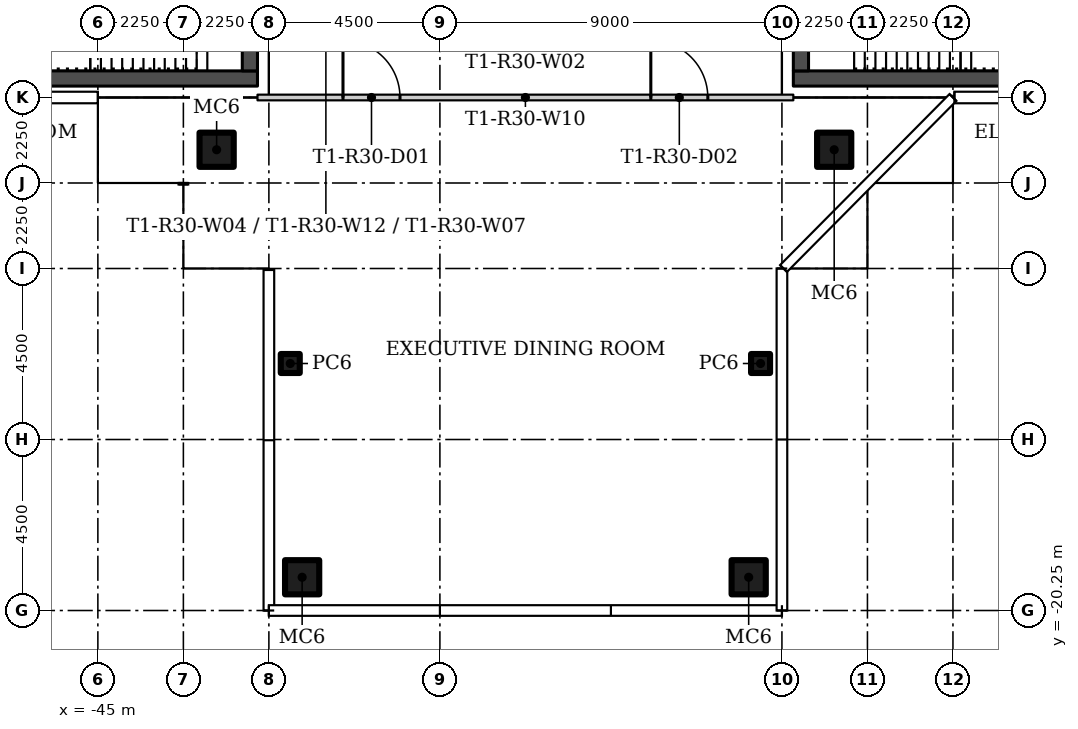
"""IFC4 building model, lengths in metres.
Left out: names, types, materials, properties, quantities, classifications, styles, units other than length and angle.
Written with IfcOpenShell. Run it as: python <this file> out.ifc"""

import sys

from ifc_helpers import new_model, si_unit, direction, frame, frame_2d, origin, origin_2d, place, context, subcontext, project, spatial, rectangle, hollow_rectangle, extrude, element, fill, save


model = new_model("IFC4")
c1 = context("Model", 3, precision=1e-05, world=origin(), true_north=direction((0.0, 1.0)))
c2 = subcontext(c1, "Body", "Model", "MODEL_VIEW")
j1 = project(units=[si_unit("LENGTHUNIT", "METRE"), si_unit("PLANEANGLEUNIT", "RADIAN")], contexts=[c1])
p1 = place(None, origin())
s1 = spatial("IfcSite", under=j1, at=p1, CompositionType="ELEMENT")
p2 = place(p1, origin())
s2 = spatial("IfcBuilding", under=s1, at=p2, CompositionType="ELEMENT")
p3 = place(p2, frame((0.0, 0.0, 269.4)))
s3 = spatial("IfcBuildingStorey", under=s2, at=p3, CompositionType="ELEMENT", Elevation=269.4)
for number, where in (
    (1, (-25.625, -8.125, 0.0)),
    (2, (-41.875, -8.125, 0.0)),
):
    element("IfcColumn", number, at=place(p3, frame(where)), inside=s3, PredefinedType="COLUMN", context=c2, shape_type="SweptSolid", body=[
        extrude(hollow_rectangle(XDim=0.9, YDim=0.9, WallThickness=0.036, at=origin_2d()), origin(), (0.0, 0.0, 1.0), 3.45),
    ])
p4 = place(p3, frame((-39.938, -13.75, 0.0)))
e3 = element("IfcColumn", 3, at=p4, inside=s3, PredefinedType="COLUMN", context=c2, shape_type="SweptSolid", body=[
    extrude(hollow_rectangle(XDim=0.5, YDim=0.5, WallThickness=0.016, at=origin_2d()), origin(), (0.0, 0.0, 1.0), 3.45),
])
p5 = place(p3, frame((-39.625, -19.375, 0.0)))
e4 = element("IfcColumn", 4, at=p5, inside=s3, PredefinedType="COLUMN", context=c2, shape_type="SweptSolid", body=[
    extrude(hollow_rectangle(XDim=0.9, YDim=0.9, WallThickness=0.036, at=origin_2d()), origin(), (0.0, 0.0, 1.0), 3.45),
])
p6 = place(p3, frame((-27.562, -13.75, 0.0)))
e5 = element("IfcColumn", 5, at=p6, inside=s3, PredefinedType="COLUMN", context=c2, shape_type="SweptSolid", body=[
    extrude(hollow_rectangle(XDim=0.5, YDim=0.5, WallThickness=0.016, at=origin_2d()), origin(), (0.0, 0.0, 1.0), 3.45),
])
p7 = place(p3, frame((-27.875, -19.375, 0.0)))
e6 = element("IfcColumn", 6, at=p7, inside=s3, PredefinedType="COLUMN", context=c2, shape_type="SweptSolid", body=[
    extrude(hollow_rectangle(XDim=0.9, YDim=0.9, WallThickness=0.036, at=origin_2d()), origin(), (0.0, 0.0, 1.0), 3.45),
])
p8 = place(p3, frame((-40.8, -6.75, 0.0)))
e7 = element("IfcWall", 7, at=p8, inside=s3, PredefinedType="PARTITIONING", context=c2, shape_type="SweptSolid", body=[
    extrude(rectangle(XDim=14.1, YDim=0.15, at=frame_2d((7.05, 0.0))), origin(), (0.0, 0.0, 1.0), 3.45),
])
p9 = place(p8, frame((2.25, 0.0, 0.0)))
e8 = element("IfcOpeningElement", 8, at=p9, cuts=e7, PredefinedType="OPENING", context=c2, shape_type="SweptSolid", body=[
    extrude(rectangle(XDim=1.5, YDim=2.1, at=frame_2d((0.75, 1.05))), frame((0.0, 0.085, 0.0), z_axis=(0.0, -1.0, 0.0), x_axis=(1.0, 0.0, 0.0)), (0.0, 0.0, 1.0), 0.17),
])
p10 = place(p8, frame((10.35, 0.0, 0.0)))
e9 = element("IfcOpeningElement", 9, at=p10, cuts=e7, PredefinedType="OPENING", context=c2, shape_type="SweptSolid", body=[
    extrude(rectangle(XDim=1.5, YDim=2.1, at=frame_2d((0.75, 1.05))), frame((0.0, 0.085, 0.0), z_axis=(0.0, -1.0, 0.0), x_axis=(1.0, 0.0, 0.0)), (0.0, 0.0, 1.0), 0.17),
])
p11 = place(p3, frame((-26.7, -6.25, 0.0)))
e10 = element("IfcWall", 10, at=p11, inside=s3, PredefinedType="SHEAR", context=c2, shape_type="SweptSolid", body=[
    extrude(rectangle(XDim=12.9, YDim=0.4, at=frame_2d((6.45, 0.0))), origin(), (0.0, 0.0, 1.0), 3.45),
])
p12 = place(p3, frame((-26.5, 6.05, 0.0), z_axis=(0.0, 0.0, 1.0), x_axis=(0.0, -1.0, 0.0)))
e11 = element("IfcWall", 11, at=p12, inside=s3, PredefinedType="SHEAR", context=c2, shape_type="SweptSolid", body=[
    extrude(rectangle(XDim=12.1, YDim=0.4, at=frame_2d((6.05, 0.0))), origin(), (0.0, 0.0, 1.0), 3.45),
])
p13 = place(p12, frame((3.9, 0.0, 0.0)))
e12 = element("IfcOpeningElement", 12, at=p13, cuts=e11, PredefinedType="OPENING", context=c2, shape_type="SweptSolid", body=[
    extrude(rectangle(XDim=1.8, YDim=2.4, at=frame_2d((0.9, 1.2))), frame((0.0, 0.21, 0.0), z_axis=(0.0, -1.0, 0.0), x_axis=(1.0, 0.0, 0.0)), (0.0, 0.0, 1.0), 0.42),
])
p14 = place(p3, frame((-40.8, -6.25, 0.0), z_axis=(0.0, 0.0, 1.0), x_axis=(-1.0, 0.0, 0.0)))
e13 = element("IfcWall", 13, at=p14, inside=s3, PredefinedType="SHEAR", context=c2, shape_type="SweptSolid", body=[
    extrude(rectangle(XDim=12.9, YDim=0.4, at=frame_2d((6.45, 0.0))), origin(), (0.0, 0.0, 1.0), 3.45),
])
p15 = place(p3, frame((-41.0, -6.05, 0.0), z_axis=(0.0, 0.0, 1.0), x_axis=(0.0, 1.0, 0.0)))
e14 = element("IfcWall", 14, at=p15, inside=s3, PredefinedType="SHEAR", context=c2, shape_type="SweptSolid", body=[
    extrude(rectangle(XDim=12.1, YDim=0.4, at=frame_2d((6.05, 0.0))), origin(), (0.0, 0.0, 1.0), 3.45),
])
p16 = place(p15, frame((6.4, 0.0, 0.0)))
e15 = element("IfcOpeningElement", 15, at=p16, cuts=e14, PredefinedType="OPENING", context=c2, shape_type="SweptSolid", body=[
    extrude(rectangle(XDim=1.8, YDim=2.4, at=frame_2d((0.9, 1.2))), frame((0.0, 0.21, 0.0), z_axis=(0.0, -1.0, 0.0), x_axis=(1.0, 0.0, 0.0)), (0.0, 0.0, 1.0), 0.42),
])
p17 = place(p9, origin())
e16 = element("IfcDoor", 16, at=p17, inside=s3, OperationType="DOUBLE_DOOR_SINGLE_SWING", PredefinedType="DOOR", context=c2, shape_type="SweptSolid", body=[
    extrude(rectangle(XDim=1.5, YDim=2.1, at=frame_2d((0.75, 1.05))), frame((0.0, 0.025, 0.0), z_axis=(0.0, -1.0, 0.0), x_axis=(1.0, 0.0, 0.0)), (0.0, 0.0, 1.0), 0.05),
])
fill(e8, e16)
p18 = place(p10, origin())
e17 = element("IfcDoor", 17, at=p18, inside=s3, OperationType="DOUBLE_DOOR_SINGLE_SWING", PredefinedType="DOOR", context=c2, shape_type="SweptSolid", body=[
    extrude(rectangle(XDim=1.5, YDim=2.1, at=frame_2d((0.75, 1.05))), frame((0.0, 0.025, 0.0), z_axis=(0.0, -1.0, 0.0), x_axis=(1.0, 0.0, 0.0)), (0.0, 0.0, 1.0), 0.05),
])
fill(e9, e17)
save(model, sys.argv[1])
